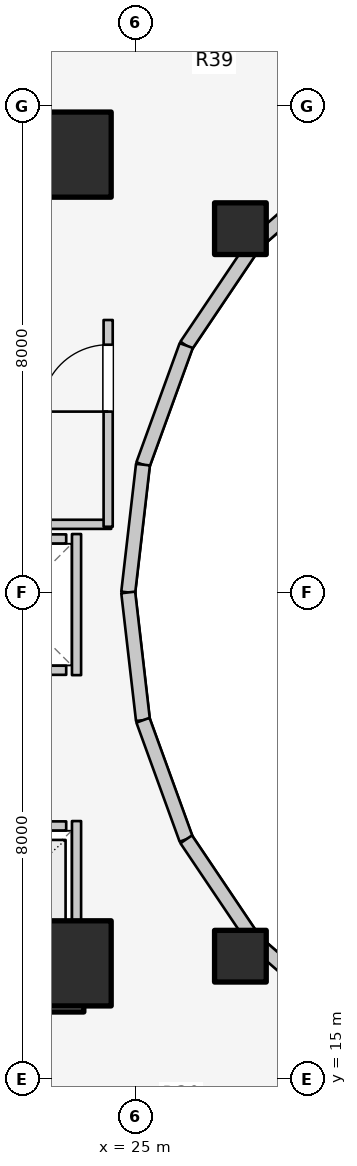
"""IFC4 building model, lengths in metres.
Left out: names, types, materials, properties, quantities, classifications, styles, units other than length and angle.
Written with IfcOpenShell. Run it as: python <this file> out.ifc"""

import sys

from ifc_helpers import new_model, si_unit, direction, frame, frame_2d, origin, origin_2d, place, context, subcontext, project, spatial, rectangle, extrude, element, fill, save


model = new_model("IFC4")
c1 = context("Model", 3, precision=1e-05, world=origin(), true_north=direction((0.0, 1.0)))
c2 = subcontext(c1, "Body", "Model", "MODEL_VIEW")
j1 = project(units=[si_unit("LENGTHUNIT", "METRE"), si_unit("PLANEANGLEUNIT", "RADIAN")], contexts=[c1])
p1 = place(None, origin())
s1 = spatial("IfcSite", under=j1, at=p1, CompositionType="ELEMENT")
p2 = place(p1, origin())
s2 = spatial("IfcBuilding", under=s1, at=p2, CompositionType="ELEMENT")
p3 = place(p2, frame((0.0, 0.0, 82.5)))
s3 = spatial("IfcBuildingStorey", under=s2, at=p3, CompositionType="ELEMENT", Elevation=82.5)
for number, where, z_axis, x_axis in (
    (1, (19.65, 16.55, 0.0), (0.0, 0.0, 1.0), (1.0, 0.0, 0.0)),
    (2, (19.65, 30.35, 0.0), (0.0, 0.0, 1.0), (1.0, 0.0, 0.0)),
):
    element("IfcWall", number, at=place(p3, frame(where, z_axis=z_axis, x_axis=x_axis)), inside=s3, PredefinedType="SHEAR", context=c2, shape_type="SweptSolid", body=[
        extrude(rectangle(XDim=4.5, YDim=0.9, at=frame_2d((2.25, 0.0))), origin(), (0.0, 0.0, 1.0), 3.1),
    ])
for number, where, z_axis, x_axis in (
    (3, (23.9, 16.9, 0.0), (0.0, 0.0, 1.0), (1.0, 0.0, 0.0)),
    (4, (23.9, 30.2, 0.0), (0.0, 0.0, 1.0), (1.0, 0.0, 0.0)),
):
    element("IfcColumn", number, at=place(p3, frame(where, z_axis=z_axis, x_axis=x_axis)), inside=s3, PredefinedType="COLUMN", context=c2, shape_type="SweptSolid", body=[
        extrude(rectangle(XDim=1.4, YDim=1.4, at=origin_2d()), origin(), (0.0, 0.0, 1.0), 3.1),
    ])
for number, where, z_axis, x_axis in (
    (5, (26.725, 28.982, 0.0), (0.0, 0.0, 1.0), (1.0, 0.0, 0.0)),
    (6, (26.725, 17.018, 0.0), (0.0, 0.0, 1.0), (1.0, 0.0, 0.0)),
):
    element("IfcColumn", number, at=place(p3, frame(where, z_axis=z_axis, x_axis=x_axis)), inside=s3, PredefinedType="COLUMN", context=c2, shape_type="SweptSolid", body=[
        extrude(rectangle(XDim=0.85, YDim=0.85, at=origin_2d()), origin(), (0.0, 0.0, 1.0), 3.1),
    ])
p4 = place(p3, frame((28.44, 30.032, 0.0), z_axis=(0.0, 0.0, 1.0), x_axis=(-0.752576694707, -0.658504607869, 0.0)))
e7 = element("IfcWall", 7, at=p4, inside=s3, PredefinedType="STANDARD", context=c2, shape_type="SweptSolid", body=[
    extrude(rectangle(XDim=1.959, YDim=0.23, at=frame_2d((0.98, 0.0))), origin(), (0.0, 0.0, 1.0), 1.22),
])
p5 = place(p3, frame((26.965, 28.742, 0.0), z_axis=(0.0, 0.0, 1.0), x_axis=(-0.558197800898, -0.829707909492, 0.0)))
e8 = element("IfcWall", 8, at=p5, inside=s3, PredefinedType="STANDARD", context=c2, shape_type="SweptSolid", body=[
    extrude(rectangle(XDim=2.027, YDim=0.23, at=frame_2d((1.013, 0.0))), origin(), (0.0, 0.0, 1.0), 1.22),
])
p6 = place(p3, frame((25.834, 27.06, 0.0), z_axis=(0.0, 0.0, 1.0), x_axis=(-0.341423187295, -0.93990968033, 0.0)))
e9 = element("IfcWall", 9, at=p6, inside=s3, PredefinedType="STANDARD", context=c2, shape_type="SweptSolid", body=[
    extrude(rectangle(XDim=2.084, YDim=0.23, at=frame_2d((1.042, 0.0))), origin(), (0.0, 0.0, 1.0), 2.56),
])
for number, where, z_axis, x_axis in (
    (10, (25.123, 25.102, 0.0), (0.0, 0.0, 1.0), (-0.115, -0.993, 0.0)),
    (11, (24.88, 23.0, 0.0), (0.0, 0.0, 1.0), (0.115, -0.993, 0.0)),
):
    element("IfcWall", number, at=place(p3, frame(where, z_axis=z_axis, x_axis=x_axis)), inside=s3, PredefinedType="STANDARD", context=c2, shape_type="SweptSolid", body=[
        extrude(rectangle(XDim=2.115, YDim=0.23, at=frame_2d((1.058, 0.0))), origin(), (0.0, 0.0, 1.0), 2.56),
    ])
p7 = place(p3, frame((25.123, 20.898, 0.0), z_axis=(0.0, 0.0, 1.0), x_axis=(0.341423187295, -0.93990968033, 0.0)))
e12 = element("IfcWall", 12, at=p7, inside=s3, PredefinedType="STANDARD", context=c2, shape_type="SweptSolid", body=[
    extrude(rectangle(XDim=2.084, YDim=0.23, at=frame_2d((1.042, 0.0))), origin(), (0.0, 0.0, 1.0), 2.56),
])
p8 = place(p3, frame((25.834, 18.94, 0.0), z_axis=(0.0, 0.0, 1.0), x_axis=(0.558197800898, -0.829707909492, 0.0)))
e13 = element("IfcWall", 13, at=p8, inside=s3, PredefinedType="STANDARD", context=c2, shape_type="SweptSolid", body=[
    extrude(rectangle(XDim=2.027, YDim=0.23, at=frame_2d((1.013, 0.0))), origin(), (0.0, 0.0, 1.0), 1.22),
])
p9 = place(p3, frame((26.965, 17.258, 0.0), z_axis=(0.0, 0.0, 1.0), x_axis=(0.752576694707, -0.658504607869, 0.0)))
e14 = element("IfcWall", 14, at=p9, inside=s3, PredefinedType="STANDARD", context=c2, shape_type="SweptSolid", body=[
    extrude(rectangle(XDim=1.959, YDim=0.23, at=frame_2d((0.98, 0.0))), origin(), (0.0, 0.0, 1.0), 1.22),
])
p10 = place(p3, frame((22.04, 19.16, 0.0), z_axis=(0.0, 0.0, 1.0), x_axis=(1.0, 0.0, 0.0)))
e15 = element("IfcWall", 15, at=p10, inside=s3, PredefinedType="SOLIDWALL", context=c2, shape_type="SweptSolid", body=[
    extrude(rectangle(XDim=1.82, YDim=0.15, at=frame_2d((0.91, 0.0))), origin(), (0.0, 0.0, 1.0), 2.12),
])
p11 = place(p10, frame((0.36, 0.0, 0.0)))
e16 = element("IfcOpeningElement", 16, at=p11, cuts=e15, PredefinedType="OPENING", context=c2, shape_type="SweptSolid", body=[
    extrude(rectangle(XDim=1.1, YDim=2.1, at=frame_2d((0.55, 1.05))), frame((0.0, 0.085, 0.0), z_axis=(0.0, -1.0, 0.0), x_axis=(1.0, 0.0, 0.0)), (0.0, 0.0, 1.0), 0.17),
])
p12 = place(p3, frame((22.04, 17.1, 0.0), z_axis=(0.0, 0.0, 1.0), x_axis=(1.0, 0.0, 0.0)))
e17 = element("IfcWall", 17, at=p12, inside=s3, PredefinedType="SOLIDWALL", context=c2, shape_type="SweptSolid", body=[
    extrude(rectangle(XDim=1.82, YDim=0.15, at=frame_2d((0.91, 0.0))), origin(), (0.0, 0.0, 1.0), 2.12),
])
p13 = place(p3, frame((24.03, 17.02, 0.0), z_axis=(0.0, 0.0, 1.0), x_axis=(0.0, 1.0, 0.0)))
e18 = element("IfcWall", 18, at=p13, inside=s3, PredefinedType="SOLIDWALL", context=c2, shape_type="SweptSolid", body=[
    extrude(rectangle(XDim=2.22, YDim=0.15, at=frame_2d((1.11, 0.0))), origin(), (0.0, 0.0, 1.0), 1.873),
])
for number, where, z_axis, x_axis in (
    (19, (22.04, 21.72, 0.0), (0.0, 0.0, 1.0), (1.0, 0.0, 0.0)),
    (20, (22.04, 23.88, 0.0), (0.0, 0.0, 1.0), (1.0, 0.0, 0.0)),
):
    element("IfcWall", number, at=place(p3, frame(where, z_axis=z_axis, x_axis=x_axis)), inside=s3, PredefinedType="SOLIDWALL", context=c2, shape_type="SweptSolid", body=[
        extrude(rectangle(XDim=1.82, YDim=0.15, at=frame_2d((0.91, 0.0))), origin(), (0.0, 0.0, 1.0), 2.12),
    ])
p14 = place(p3, frame((24.03, 21.64, 0.0), z_axis=(0.0, 0.0, 1.0), x_axis=(0.0, 1.0, 0.0)))
e21 = element("IfcWall", 21, at=p14, inside=s3, PredefinedType="SOLIDWALL", context=c2, shape_type="SweptSolid", body=[
    extrude(rectangle(XDim=2.32, YDim=0.15, at=frame_2d((1.16, 0.0))), origin(), (0.0, 0.0, 1.0), 2.12),
])
p15 = place(p3, frame((19.52, 24.12, 0.0), z_axis=(0.0, 0.0, 1.0), x_axis=(1.0, 0.0, 0.0)))
e22 = element("IfcWall", 22, at=p15, inside=s3, PredefinedType="PARTITIONING", context=c2, shape_type="SweptSolid", body=[
    extrude(rectangle(XDim=5.08, YDim=0.15, at=frame_2d((2.54, 0.0))), origin(), (0.0, 0.0, 1.0), 2.12),
])
p16 = place(p3, frame((24.55, 24.08, 0.0), z_axis=(0.0, 0.0, 1.0), x_axis=(0.0, 1.0, 0.0)))
e23 = element("IfcWall", 23, at=p16, inside=s3, PredefinedType="PARTITIONING", context=c2, shape_type="SweptSolid", body=[
    extrude(rectangle(XDim=3.4, YDim=0.15, at=frame_2d((1.7, 0.0))), origin(), (0.0, 0.0, 1.0), 2.575),
])
p17 = place(p16, frame((1.894, 0.0, 0.0)))
e24 = element("IfcOpeningElement", 24, at=p17, cuts=e23, PredefinedType="OPENING", context=c2, shape_type="SweptSolid", body=[
    extrude(rectangle(XDim=1.1, YDim=2.1, at=frame_2d((0.55, 1.05))), frame((0.0, 0.085, 0.0), z_axis=(0.0, -1.0, 0.0), x_axis=(1.0, 0.0, 0.0)), (0.0, 0.0, 1.0), 0.17),
])
p18 = place(p17, origin())
e25 = element("IfcDoor", 25, at=p18, inside=s3, OperationType="SINGLE_SWING_LEFT", PredefinedType="DOOR", context=c2, shape_type="SweptSolid", body=[
    extrude(rectangle(XDim=1.1, YDim=2.1, at=frame_2d((0.55, 1.05))), frame((0.0, 0.025, 0.0), z_axis=(0.0, -1.0, 0.0), x_axis=(1.0, 0.0, 0.0)), (0.0, 0.0, 1.0), 0.05),
])
fill(e24, e25)
save(model, sys.argv[1])
